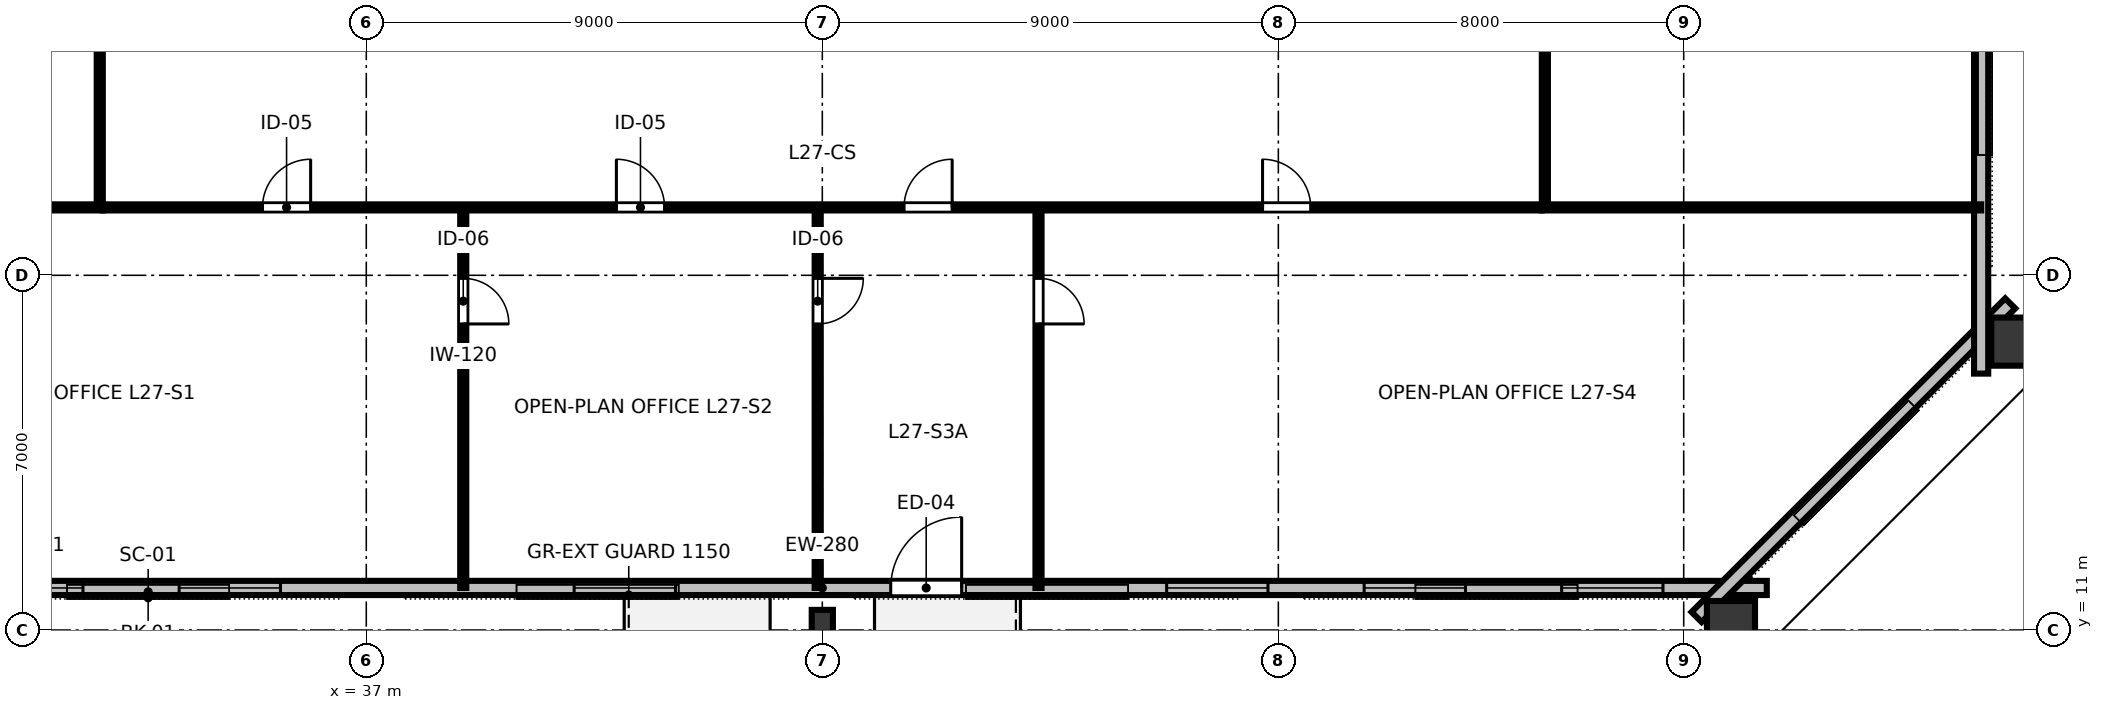
"""IFC4 building model, lengths in metres.
Left out: names, types, materials, properties, quantities, classifications, styles, units other than length and angle.
Written with IfcOpenShell. Run it as: python <this file> out.ifc"""

import sys

from ifc_helpers import new_model, si_unit, direction, frame, frame_2d, origin, origin_2d, place, context, subcontext, project, spatial, rectangle, hollow_rectangle, i_section, extrude, element, fill, save


model = new_model("IFC4")
c1 = context("Model", 3, precision=1e-05, world=origin(), true_north=direction((0.0, 1.0)))
c2 = subcontext(c1, "Body", "Model", "MODEL_VIEW")
j1 = project(units=[si_unit("LENGTHUNIT", "METRE"), si_unit("PLANEANGLEUNIT", "RADIAN")], contexts=[c1])
p1 = place(None, origin())
s1 = spatial("IfcSite", under=j1, at=p1, CompositionType="ELEMENT")
p2 = place(p1, origin())
s2 = spatial("IfcBuilding", under=s1, at=p2, CompositionType="ELEMENT")
p3 = place(p2, frame((0.0, 0.0, 106.0)))
s3 = spatial("IfcBuildingStorey", under=s2, at=p3, CompositionType="ELEMENT", Elevation=106.0)
p4 = place(p3, frame((46.0, 11.17, 0.0), z_axis=(0.0, 0.0, 1.0), x_axis=(1.0, 0.0, 0.0)))
e1 = element("IfcColumn", 1, at=p4, inside=s3, PredefinedType="COLUMN", context=c2, shape_type="SweptSolid", body=[
    extrude(i_section(OverallWidth=0.418, OverallDepth=0.455, WebThickness=0.042, FlangeThickness=0.068, FilletRadius=0.025, at=origin_2d()), origin(), (0.0, 0.0, 1.0), 3.358),
])
for number, where, z_axis, x_axis in (
    (2, (63.933, 10.998, 0.0), (0.0, 0.0, 1.0), (1.0, 0.0, 0.0)),
    (3, (69.646, 16.691, 0.0), (0.0, 0.0, 1.0), (0.0, 1.0, 0.0)),
):
    element("IfcColumn", number, at=place(p3, frame(where, z_axis=z_axis, x_axis=x_axis)), inside=s3, PredefinedType="COLUMN", context=c2, shape_type="SweptSolid", body=[
        extrude(hollow_rectangle(XDim=0.95, YDim=1.15, WallThickness=0.06, at=origin_2d()), origin(), (0.0, 0.0, 1.0), 3.358),
    ])
p5 = place(p3, frame((27.36, 11.83, 0.0), z_axis=(0.0, 0.0, 1.0), x_axis=(1.0, 0.0, 0.0)))
e4 = element("IfcWall", 4, at=p5, inside=s3, PredefinedType="STANDARD", context=c2, shape_type="SweptSolid", body=[
    extrude(rectangle(XDim=37.28, YDim=0.28, at=frame_2d((18.64, 0.0))), origin(), (0.0, 0.0, 1.0), 3.36),
])
p6 = place(p5, frame((19.99, 0.0, 0.0)))
e5 = element("IfcOpeningElement", 5, at=p6, cuts=e4, PredefinedType="OPENING", context=c2, shape_type="SweptSolid", body=[
    extrude(rectangle(XDim=1.4, YDim=2.15, at=frame_2d((0.7, 1.075))), frame((0.0, 0.15, 0.0), z_axis=(0.0, -1.0, 0.0), x_axis=(1.0, 0.0, 0.0)), (0.0, 0.0, 1.0), 0.3),
])
p7 = place(p5, frame((2.049, 0.0, 0.8)))
e6 = element("IfcOpeningElement", 6, at=p7, cuts=e4, PredefinedType="OPENING", context=c2, shape_type="SweptSolid", body=[
    extrude(rectangle(XDim=2.0, YDim=1.95, at=frame_2d((1.0, 0.975))), frame((0.0, 0.15, 0.0), z_axis=(0.0, -1.0, 0.0), x_axis=(1.0, 0.0, 0.0)), (0.0, 0.0, 1.0), 0.3),
])
p8 = place(p5, frame((5.947, 0.0, 0.8)))
e7 = element("IfcOpeningElement", 7, at=p8, cuts=e4, PredefinedType="OPENING", context=c2, shape_type="SweptSolid", body=[
    extrude(rectangle(XDim=2.0, YDim=1.95, at=frame_2d((1.0, 0.975))), frame((0.0, 0.15, 0.0), z_axis=(0.0, -1.0, 0.0), x_axis=(1.0, 0.0, 0.0)), (0.0, 0.0, 1.0), 0.3),
])
p9 = place(p5, frame((13.742, 0.0, 0.8)))
e8 = element("IfcOpeningElement", 8, at=p9, cuts=e4, PredefinedType="OPENING", context=c2, shape_type="SweptSolid", body=[
    extrude(rectangle(XDim=2.0, YDim=1.95, at=frame_2d((1.0, 0.975))), frame((0.0, 0.15, 0.0), z_axis=(0.0, -1.0, 0.0), x_axis=(1.0, 0.0, 0.0)), (0.0, 0.0, 1.0), 0.3),
])
p10 = place(p5, frame((25.436, 0.0, 0.8)))
e9 = element("IfcOpeningElement", 9, at=p10, cuts=e4, PredefinedType="OPENING", context=c2, shape_type="SweptSolid", body=[
    extrude(rectangle(XDim=2.0, YDim=1.95, at=frame_2d((1.0, 0.975))), frame((0.0, 0.15, 0.0), z_axis=(0.0, -1.0, 0.0), x_axis=(1.0, 0.0, 0.0)), (0.0, 0.0, 1.0), 0.3),
])
p11 = place(p5, frame((29.333, 0.0, 0.8)))
e10 = element("IfcOpeningElement", 10, at=p11, cuts=e4, PredefinedType="OPENING", context=c2, shape_type="SweptSolid", body=[
    extrude(rectangle(XDim=2.0, YDim=1.95, at=frame_2d((1.0, 0.975))), frame((0.0, 0.15, 0.0), z_axis=(0.0, -1.0, 0.0), x_axis=(1.0, 0.0, 0.0)), (0.0, 0.0, 1.0), 0.3),
])
p12 = place(p5, frame((33.231, 0.0, 0.8)))
e11 = element("IfcOpeningElement", 11, at=p12, cuts=e4, PredefinedType="OPENING", context=c2, shape_type="SweptSolid", body=[
    extrude(rectangle(XDim=2.0, YDim=1.95, at=frame_2d((1.0, 0.975))), frame((0.0, 0.15, 0.0), z_axis=(0.0, -1.0, 0.0), x_axis=(1.0, 0.0, 0.0)), (0.0, 0.0, 1.0), 0.3),
])
p13 = place(p3, frame((63.254, 11.256, 0.0), z_axis=(0.0, 0.0, 1.0), x_axis=(0.707106781187, 0.707106781187, 0.0)))
e12 = element("IfcWall", 12, at=p13, inside=s3, PredefinedType="STANDARD", context=c2, shape_type="SweptSolid", body=[
    extrude(rectangle(XDim=8.753, YDim=0.28, at=frame_2d((4.376, 0.0))), origin(), (0.0, 0.0, 1.0), 3.36),
])
p14 = place(p3, frame((68.87, 16.06, 0.0), z_axis=(0.0, 0.0, 1.0), x_axis=(0.0, 1.0, 0.0)))
e13 = element("IfcWall", 13, at=p14, inside=s3, PredefinedType="STANDARD", context=c2, shape_type="SweptSolid", body=[
    extrude(rectangle(XDim=31.88, YDim=0.28, at=frame_2d((15.94, 0.0))), origin(), (0.0, 0.0, 1.0), 3.36),
])
p15 = place(p3, frame((38.914, 19.34, 0.0), z_axis=(0.0, 0.0, 1.0), x_axis=(0.0, -1.0, 0.0)))
e14 = element("IfcWall", 14, at=p15, inside=s3, PredefinedType="PARTITIONING", context=c2, shape_type="SweptSolid", body=[
    extrude(rectangle(XDim=7.51, YDim=0.12, at=frame_2d((3.755, 0.0))), origin(), (0.0, 0.0, 1.0), 2.64),
])
p16 = place(p15, frame((1.4, 0.0, 0.0)))
e15 = element("IfcOpeningElement", 15, at=p16, cuts=e14, PredefinedType="OPENING", context=c2, shape_type="SweptSolid", body=[
    extrude(rectangle(XDim=0.9, YDim=2.15, at=frame_2d((0.45, 1.075))), frame((0.0, 0.07, 0.0), z_axis=(0.0, -1.0, 0.0), x_axis=(1.0, 0.0, 0.0)), (0.0, 0.0, 1.0), 0.14),
])
p17 = place(p3, frame((45.909, 19.34, 0.0), z_axis=(0.0, 0.0, 1.0), x_axis=(0.0, -1.0, 0.0)))
e16 = element("IfcWall", 16, at=p17, inside=s3, PredefinedType="PARTITIONING", context=c2, shape_type="SweptSolid", body=[
    extrude(rectangle(XDim=7.51, YDim=0.12, at=frame_2d((3.755, 0.0))), origin(), (0.0, 0.0, 1.0), 2.64),
])
p18 = place(p17, frame((1.4, 0.0, 0.0)))
e17 = element("IfcOpeningElement", 17, at=p18, cuts=e16, PredefinedType="OPENING", context=c2, shape_type="SweptSolid", body=[
    extrude(rectangle(XDim=0.9, YDim=2.15, at=frame_2d((0.45, 1.075))), frame((0.0, 0.07, 0.0), z_axis=(0.0, -1.0, 0.0), x_axis=(1.0, 0.0, 0.0)), (0.0, 0.0, 1.0), 0.14),
])
p19 = place(p3, frame((50.267, 19.34, 0.0), z_axis=(0.0, 0.0, 1.0), x_axis=(0.0, -1.0, 0.0)))
e18 = element("IfcWall", 18, at=p19, inside=s3, PredefinedType="PARTITIONING", context=c2, shape_type="SweptSolid", body=[
    extrude(rectangle(XDim=7.51, YDim=0.12, at=frame_2d((3.755, 0.0))), origin(), (0.0, 0.0, 1.0), 2.64),
])
p20 = place(p19, frame((1.4, 0.0, 0.0)))
e19 = element("IfcOpeningElement", 19, at=p20, cuts=e18, PredefinedType="OPENING", context=c2, shape_type="SweptSolid", body=[
    extrude(rectangle(XDim=0.9, YDim=2.15, at=frame_2d((0.45, 1.075))), frame((0.0, 0.07, 0.0), z_axis=(0.0, -1.0, 0.0), x_axis=(1.0, 0.0, 0.0)), (0.0, 0.0, 1.0), 0.14),
])
p21 = place(p3, frame((31.8, 19.34, 0.0), z_axis=(0.0, 0.0, 1.0), x_axis=(1.0, 0.0, 0.0)))
e20 = element("IfcWall", 20, at=p21, inside=s3, PredefinedType="PARTITIONING", context=c2, shape_type="SweptSolid", body=[
    extrude(rectangle(XDim=28.4, YDim=0.12, at=frame_2d((14.2, 0.0))), origin(), (0.0, 0.0, 1.0), 2.64),
])
p22 = place(p21, frame((3.152, 0.0, 0.0)))
e21 = element("IfcOpeningElement", 21, at=p22, cuts=e20, PredefinedType="OPENING", context=c2, shape_type="SweptSolid", body=[
    extrude(rectangle(XDim=0.95, YDim=2.15, at=frame_2d((0.475, 1.075))), frame((0.0, 0.07, 0.0), z_axis=(0.0, -1.0, 0.0), x_axis=(1.0, 0.0, 0.0)), (0.0, 0.0, 1.0), 0.14),
])
p23 = place(p21, frame((10.136, 0.0, 0.0)))
e22 = element("IfcOpeningElement", 22, at=p23, cuts=e20, PredefinedType="OPENING", context=c2, shape_type="SweptSolid", body=[
    extrude(rectangle(XDim=0.95, YDim=2.15, at=frame_2d((0.475, 1.075))), frame((0.0, 0.07, 0.0), z_axis=(0.0, -1.0, 0.0), x_axis=(1.0, 0.0, 0.0)), (0.0, 0.0, 1.0), 0.14),
])
p24 = place(p21, frame((15.813, 0.0, 0.0)))
e23 = element("IfcOpeningElement", 23, at=p24, cuts=e20, PredefinedType="OPENING", context=c2, shape_type="SweptSolid", body=[
    extrude(rectangle(XDim=0.95, YDim=2.15, at=frame_2d((0.475, 1.075))), frame((0.0, 0.07, 0.0), z_axis=(0.0, -1.0, 0.0), x_axis=(1.0, 0.0, 0.0)), (0.0, 0.0, 1.0), 0.14),
])
p25 = place(p21, frame((22.888, 0.0, 0.0)))
e24 = element("IfcOpeningElement", 24, at=p25, cuts=e20, PredefinedType="OPENING", context=c2, shape_type="SweptSolid", body=[
    extrude(rectangle(XDim=0.95, YDim=2.15, at=frame_2d((0.475, 1.075))), frame((0.0, 0.07, 0.0), z_axis=(0.0, -1.0, 0.0), x_axis=(1.0, 0.0, 0.0)), (0.0, 0.0, 1.0), 0.14),
])
p26 = place(p3, frame((31.74, 19.4, 0.0), z_axis=(0.0, 0.0, 1.0), x_axis=(0.0, 1.0, 0.0)))
e25 = element("IfcWall", 25, at=p26, inside=s3, PredefinedType="PARTITIONING", context=c2, shape_type="SweptSolid", body=[
    extrude(rectangle(XDim=11.58, YDim=0.12, at=frame_2d((5.79, 0.0))), origin(), (0.0, 0.0, 1.0), 2.64),
])
p27 = place(p26, frame((5.415, 0.0, 0.0)))
e26 = element("IfcOpeningElement", 26, at=p27, cuts=e25, PredefinedType="OPENING", context=c2, shape_type="SweptSolid", body=[
    extrude(rectangle(XDim=0.95, YDim=2.15, at=frame_2d((0.475, 1.075))), frame((0.0, 0.07, 0.0), z_axis=(0.0, -1.0, 0.0), x_axis=(1.0, 0.0, 0.0)), (0.0, 0.0, 1.0), 0.14),
])
p28 = place(p3, frame((60.26, 19.4, 0.0), z_axis=(0.0, 0.0, 1.0), x_axis=(0.0, 1.0, 0.0)))
e27 = element("IfcWall", 27, at=p28, inside=s3, PredefinedType="PARTITIONING", context=c2, shape_type="SweptSolid", body=[
    extrude(rectangle(XDim=11.58, YDim=0.12, at=frame_2d((5.79, 0.0))), origin(), (0.0, 0.0, 1.0), 2.64),
])
p29 = place(p28, frame((5.415, 0.0, 0.0)))
e28 = element("IfcOpeningElement", 28, at=p29, cuts=e27, PredefinedType="OPENING", context=c2, shape_type="SweptSolid", body=[
    extrude(rectangle(XDim=0.95, YDim=2.15, at=frame_2d((0.475, 1.075))), frame((0.0, 0.07, 0.0), z_axis=(0.0, -1.0, 0.0), x_axis=(1.0, 0.0, 0.0)), (0.0, 0.0, 1.0), 0.14),
])
for number, where, z_axis, x_axis in (
    (29, (31.8, 19.34, 0.0), (0.0, 0.0, 1.0), (-1.0, 0.0, 0.0)),
    (30, (60.2, 19.34, 0.0), (0.0, 0.0, 1.0), (1.0, 0.0, 0.0)),
):
    element("IfcWall", number, at=place(p3, frame(where, z_axis=z_axis, x_axis=x_axis)), inside=s3, PredefinedType="PARTITIONING", context=c2, shape_type="SweptSolid", body=[
        extrude(rectangle(XDim=8.67, YDim=0.12, at=frame_2d((4.335, 0.0))), origin(), (0.0, 0.0, 1.0), 2.64),
    ])
p30 = place(p6, origin())
e31 = element("IfcDoor", 31, at=p30, inside=s3, OperationType="SINGLE_SWING_RIGHT", PredefinedType="DOOR", context=c2, shape_type="SweptSolid", body=[
    extrude(rectangle(XDim=1.4, YDim=2.15, at=frame_2d((0.7, 1.075))), frame((0.0, 0.025, 0.0), z_axis=(0.0, -1.0, 0.0), x_axis=(1.0, 0.0, 0.0)), (0.0, 0.0, 1.0), 0.05),
])
fill(e5, e31)
p31 = place(p7, origin())
e32 = element("IfcWindow", 32, at=p31, inside=s3, PartitioningType="SINGLE_PANEL", PredefinedType="WINDOW", context=c2, shape_type="SweptSolid", body=[
    extrude(rectangle(XDim=2.0, YDim=1.95, at=frame_2d((1.0, 0.975))), frame((0.0, 0.03, 0.0), z_axis=(0.0, -1.0, 0.0), x_axis=(1.0, 0.0, 0.0)), (0.0, 0.0, 1.0), 0.06),
])
fill(e6, e32)
p32 = place(p8, origin())
e33 = element("IfcWindow", 33, at=p32, inside=s3, PartitioningType="SINGLE_PANEL", PredefinedType="WINDOW", context=c2, shape_type="SweptSolid", body=[
    extrude(rectangle(XDim=2.0, YDim=1.95, at=frame_2d((1.0, 0.975))), frame((0.0, 0.03, 0.0), z_axis=(0.0, -1.0, 0.0), x_axis=(1.0, 0.0, 0.0)), (0.0, 0.0, 1.0), 0.06),
])
fill(e7, e33)
p33 = place(p9, origin())
e34 = element("IfcWindow", 34, at=p33, inside=s3, PartitioningType="SINGLE_PANEL", PredefinedType="WINDOW", context=c2, shape_type="SweptSolid", body=[
    extrude(rectangle(XDim=2.0, YDim=1.95, at=frame_2d((1.0, 0.975))), frame((0.0, 0.03, 0.0), z_axis=(0.0, -1.0, 0.0), x_axis=(1.0, 0.0, 0.0)), (0.0, 0.0, 1.0), 0.06),
])
fill(e8, e34)
p34 = place(p10, origin())
e35 = element("IfcWindow", 35, at=p34, inside=s3, PartitioningType="SINGLE_PANEL", PredefinedType="WINDOW", context=c2, shape_type="SweptSolid", body=[
    extrude(rectangle(XDim=2.0, YDim=1.95, at=frame_2d((1.0, 0.975))), frame((0.0, 0.03, 0.0), z_axis=(0.0, -1.0, 0.0), x_axis=(1.0, 0.0, 0.0)), (0.0, 0.0, 1.0), 0.06),
])
fill(e9, e35)
p35 = place(p11, origin())
e36 = element("IfcWindow", 36, at=p35, inside=s3, PartitioningType="SINGLE_PANEL", PredefinedType="WINDOW", context=c2, shape_type="SweptSolid", body=[
    extrude(rectangle(XDim=2.0, YDim=1.95, at=frame_2d((1.0, 0.975))), frame((0.0, 0.03, 0.0), z_axis=(0.0, -1.0, 0.0), x_axis=(1.0, 0.0, 0.0)), (0.0, 0.0, 1.0), 0.06),
])
fill(e10, e36)
p36 = place(p12, origin())
e37 = element("IfcWindow", 37, at=p36, inside=s3, PartitioningType="SINGLE_PANEL", PredefinedType="WINDOW", context=c2, shape_type="SweptSolid", body=[
    extrude(rectangle(XDim=2.0, YDim=1.95, at=frame_2d((1.0, 0.975))), frame((0.0, 0.03, 0.0), z_axis=(0.0, -1.0, 0.0), x_axis=(1.0, 0.0, 0.0)), (0.0, 0.0, 1.0), 0.06),
])
fill(e11, e37)
p37 = place(p16, origin())
e38 = element("IfcDoor", 38, at=p37, inside=s3, OperationType="SINGLE_SWING_RIGHT", PredefinedType="DOOR", context=c2, shape_type="SweptSolid", body=[
    extrude(rectangle(XDim=0.9, YDim=2.15, at=frame_2d((0.45, 1.075))), frame((0.0, 0.025, 0.0), z_axis=(0.0, -1.0, 0.0), x_axis=(1.0, 0.0, 0.0)), (0.0, 0.0, 1.0), 0.05),
])
fill(e15, e38)
p38 = place(p18, origin())
e39 = element("IfcDoor", 39, at=p38, inside=s3, OperationType="SINGLE_SWING_LEFT", PredefinedType="DOOR", context=c2, shape_type="SweptSolid", body=[
    extrude(rectangle(XDim=0.9, YDim=2.15, at=frame_2d((0.45, 1.075))), frame((0.0, 0.025, 0.0), z_axis=(0.0, -1.0, 0.0), x_axis=(1.0, 0.0, 0.0)), (0.0, 0.0, 1.0), 0.05),
])
fill(e17, e39)
p39 = place(p20, origin())
e40 = element("IfcDoor", 40, at=p39, inside=s3, OperationType="SINGLE_SWING_RIGHT", PredefinedType="DOOR", context=c2, shape_type="SweptSolid", body=[
    extrude(rectangle(XDim=0.9, YDim=2.15, at=frame_2d((0.45, 1.075))), frame((0.0, 0.025, 0.0), z_axis=(0.0, -1.0, 0.0), x_axis=(1.0, 0.0, 0.0)), (0.0, 0.0, 1.0), 0.05),
])
fill(e19, e40)
p40 = place(p22, origin())
e41 = element("IfcDoor", 41, at=p40, inside=s3, OperationType="SINGLE_SWING_RIGHT", PredefinedType="DOOR", context=c2, shape_type="SweptSolid", body=[
    extrude(rectangle(XDim=0.95, YDim=2.15, at=frame_2d((0.475, 1.075))), frame((0.0, 0.025, 0.0), z_axis=(0.0, -1.0, 0.0), x_axis=(1.0, 0.0, 0.0)), (0.0, 0.0, 1.0), 0.05),
])
fill(e21, e41)
p41 = place(p23, origin())
e42 = element("IfcDoor", 42, at=p41, inside=s3, OperationType="SINGLE_SWING_LEFT", PredefinedType="DOOR", context=c2, shape_type="SweptSolid", body=[
    extrude(rectangle(XDim=0.95, YDim=2.15, at=frame_2d((0.475, 1.075))), frame((0.0, 0.025, 0.0), z_axis=(0.0, -1.0, 0.0), x_axis=(1.0, 0.0, 0.0)), (0.0, 0.0, 1.0), 0.05),
])
fill(e22, e42)
p42 = place(p24, origin())
e43 = element("IfcDoor", 43, at=p42, inside=s3, OperationType="SINGLE_SWING_RIGHT", PredefinedType="DOOR", context=c2, shape_type="SweptSolid", body=[
    extrude(rectangle(XDim=0.95, YDim=2.15, at=frame_2d((0.475, 1.075))), frame((0.0, 0.025, 0.0), z_axis=(0.0, -1.0, 0.0), x_axis=(1.0, 0.0, 0.0)), (0.0, 0.0, 1.0), 0.05),
])
fill(e23, e43)
p43 = place(p25, origin())
e44 = element("IfcDoor", 44, at=p43, inside=s3, OperationType="SINGLE_SWING_LEFT", PredefinedType="DOOR", context=c2, shape_type="SweptSolid", body=[
    extrude(rectangle(XDim=0.95, YDim=2.15, at=frame_2d((0.475, 1.075))), frame((0.0, 0.025, 0.0), z_axis=(0.0, -1.0, 0.0), x_axis=(1.0, 0.0, 0.0)), (0.0, 0.0, 1.0), 0.05),
])
fill(e24, e44)
save(model, sys.argv[1])
